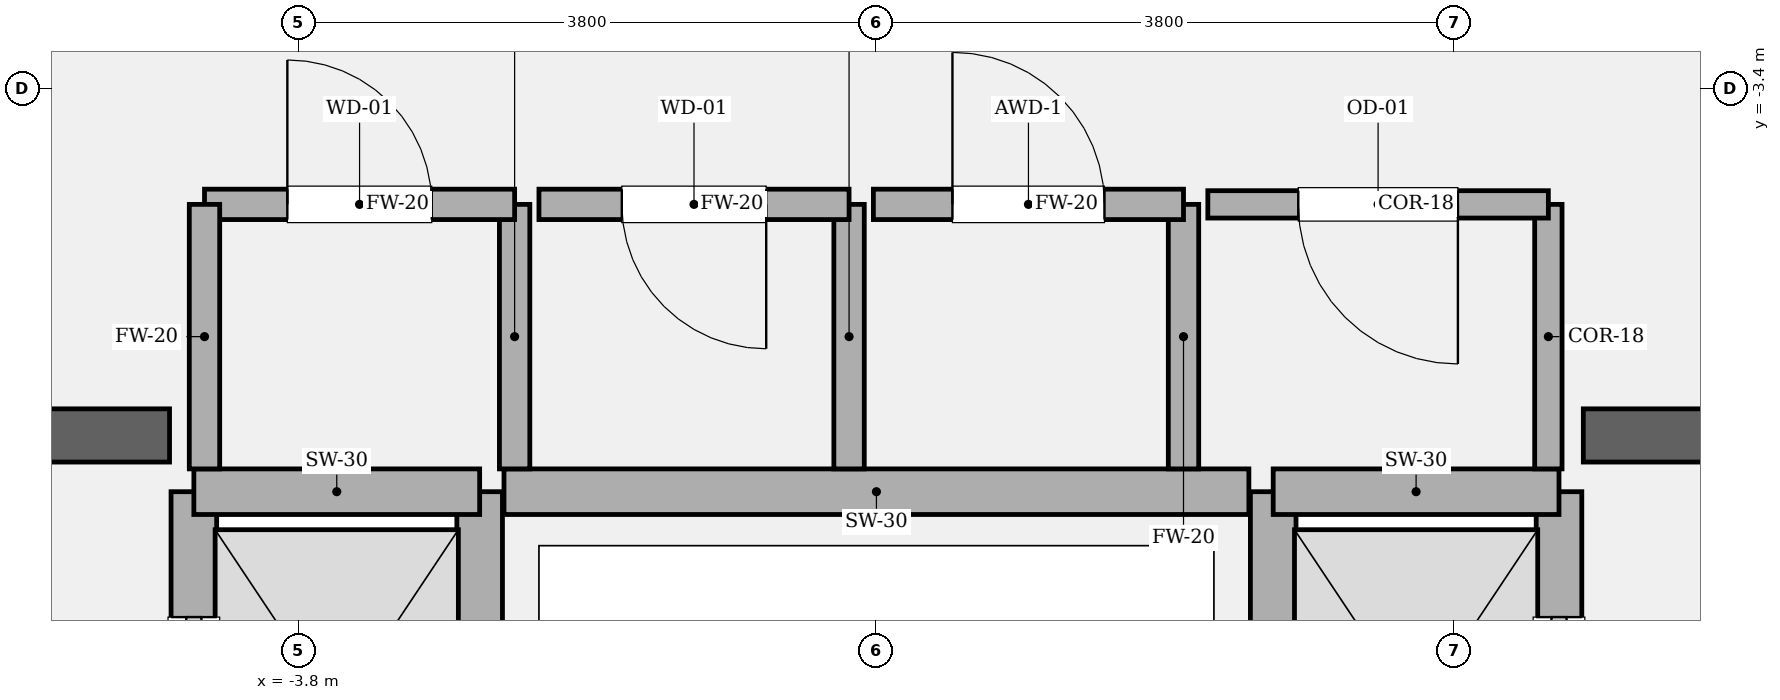
"""IFC4 building model, lengths in metres.
Left out: names, types, materials, properties, quantities, classifications, styles, units other than length and angle.
Written with IfcOpenShell. Run it as: python <this file> out.ifc"""

import sys

from ifc_helpers import new_model, si_unit, direction, frame, frame_2d, origin, place, context, subcontext, project, spatial, rectangle, extrude, element, fill, save


model = new_model("IFC4")
c1 = context("Model", 3, precision=1e-05, world=origin(), true_north=direction((0.0, 1.0)))
c2 = subcontext(c1, "Body", "Model", "MODEL_VIEW")
j1 = project(units=[si_unit("LENGTHUNIT", "METRE"), si_unit("PLANEANGLEUNIT", "RADIAN")], contexts=[c1])
p1 = place(None, origin())
s1 = spatial("IfcSite", under=j1, at=p1, CompositionType="ELEMENT")
p2 = place(p1, origin())
s2 = spatial("IfcBuilding", under=s1, at=p2, CompositionType="ELEMENT")
p3 = place(p2, frame((0.0, 0.0, 6.0)))
s3 = spatial("IfcBuildingStorey", under=s2, at=p3, CompositionType="ELEMENT", Elevation=6.0)
p4 = place(p3, frame((-9.825, -5.68, 0.0), z_axis=(0.0, 0.0, 1.0), x_axis=(1.0, 0.0, 0.0)))
e1 = element("IfcWall", 1, at=p4, inside=s3, PredefinedType="SOLIDWALL", context=c2, shape_type="SweptSolid", body=[
    extrude(rectangle(XDim=5.175, YDim=0.35, at=frame_2d((2.587, 0.0))), origin(), (0.0, 0.0, 1.0), 5.4),
])
p5 = place(p4, frame((1.285, 0.0, 0.0)))
e2 = element("IfcOpeningElement", 2, at=p5, cuts=e1, PredefinedType="OPENING", context=c2, shape_type="SweptSolid", body=[
    extrude(rectangle(XDim=1.18, YDim=2.2, at=frame_2d((0.59, 1.1))), frame((0.0, 0.185, 0.0), z_axis=(0.0, -1.0, 0.0), x_axis=(1.0, 0.0, 0.0)), (0.0, 0.0, 1.0), 0.37),
])
p6 = place(p3, frame((4.65, -5.68, 0.0), z_axis=(0.0, 0.0, 1.0), x_axis=(1.0, 0.0, 0.0)))
e3 = element("IfcWall", 3, at=p6, inside=s3, PredefinedType="SOLIDWALL", context=c2, shape_type="SweptSolid", body=[
    extrude(rectangle(XDim=5.175, YDim=0.35, at=frame_2d((2.587, 0.0))), origin(), (0.0, 0.0, 1.0), 5.4),
])
p7 = place(p6, frame((2.71, 0.0, 0.0)))
e4 = element("IfcOpeningElement", 4, at=p7, cuts=e3, PredefinedType="OPENING", context=c2, shape_type="SweptSolid", body=[
    extrude(rectangle(XDim=1.18, YDim=2.2, at=frame_2d((0.59, 1.1))), frame((0.0, 0.185, 0.0), z_axis=(0.0, -1.0, 0.0), x_axis=(1.0, 0.0, 0.0)), (0.0, 0.0, 1.0), 0.37),
])
p8 = place(p3, frame((-4.49, -8.82, 0.0), z_axis=(0.0, 0.0, 1.0), x_axis=(0.0, 1.0, 0.0)))
e5 = element("IfcWall", 5, at=p8, inside=s3, PredefinedType="SOLIDWALL", context=c2, shape_type="SweptSolid", body=[
    extrude(rectangle(XDim=2.77, YDim=0.3, at=frame_2d((1.385, 0.0))), origin(), (0.0, 0.0, 1.0), 5.12),
])
p9 = place(p8, frame((0.825, 0.0, 0.0)))
e6 = element("IfcOpeningElement", 6, at=p9, cuts=e5, PredefinedType="OPENING", context=c2, shape_type="SweptSolid", body=[
    extrude(rectangle(XDim=1.12, YDim=2.25, at=frame_2d((0.56, 1.125))), frame((0.0, 0.16, 0.0), z_axis=(0.0, -1.0, 0.0), x_axis=(1.0, 0.0, 0.0)), (0.0, 0.0, 1.0), 0.32),
])
p10 = place(p3, frame((-2.61, -8.82, 0.0), z_axis=(0.0, 0.0, 1.0), x_axis=(0.0, 1.0, 0.0)))
e7 = element("IfcWall", 7, at=p10, inside=s3, PredefinedType="SOLIDWALL", context=c2, shape_type="SweptSolid", body=[
    extrude(rectangle(XDim=2.77, YDim=0.3, at=frame_2d((1.385, 0.0))), origin(), (0.0, 0.0, 1.0), 5.12),
])
p11 = place(p3, frame((-4.49, -6.05, 0.0), z_axis=(0.0, 0.0, 1.0), x_axis=(1.0, 0.0, 0.0)))
e8 = element("IfcWall", 8, at=p11, inside=s3, PredefinedType="SOLIDWALL", context=c2, shape_type="SweptSolid", body=[
    extrude(rectangle(XDim=1.88, YDim=0.3, at=frame_2d((0.94, 0.0))), origin(), (0.0, 0.0, 1.0), 5.12),
])
p12 = place(p3, frame((4.49, -8.82, 0.0), z_axis=(0.0, 0.0, 1.0), x_axis=(0.0, 1.0, 0.0)))
e9 = element("IfcWall", 9, at=p12, inside=s3, PredefinedType="SOLIDWALL", context=c2, shape_type="SweptSolid", body=[
    extrude(rectangle(XDim=2.77, YDim=0.3, at=frame_2d((1.385, 0.0))), origin(), (0.0, 0.0, 1.0), 5.12),
])
p13 = place(p12, frame((0.825, 0.0, 0.0)))
e10 = element("IfcOpeningElement", 10, at=p13, cuts=e9, PredefinedType="OPENING", context=c2, shape_type="SweptSolid", body=[
    extrude(rectangle(XDim=1.12, YDim=2.25, at=frame_2d((0.56, 1.125))), frame((0.0, 0.16, 0.0), z_axis=(0.0, -1.0, 0.0), x_axis=(1.0, 0.0, 0.0)), (0.0, 0.0, 1.0), 0.32),
])
p14 = place(p3, frame((2.61, -8.82, 0.0), z_axis=(0.0, 0.0, 1.0), x_axis=(0.0, 1.0, 0.0)))
e11 = element("IfcWall", 11, at=p14, inside=s3, PredefinedType="SOLIDWALL", context=c2, shape_type="SweptSolid", body=[
    extrude(rectangle(XDim=2.77, YDim=0.3, at=frame_2d((1.385, 0.0))), origin(), (0.0, 0.0, 1.0), 5.12),
])
p15 = place(p3, frame((2.61, -6.05, 0.0), z_axis=(0.0, 0.0, 1.0), x_axis=(1.0, 0.0, 0.0)))
e12 = element("IfcWall", 12, at=p15, inside=s3, PredefinedType="SOLIDWALL", context=c2, shape_type="SweptSolid", body=[
    extrude(rectangle(XDim=1.88, YDim=0.3, at=frame_2d((0.94, 0.0))), origin(), (0.0, 0.0, 1.0), 5.12),
])
p16 = place(p3, frame((-2.45, -6.05, 0.0), z_axis=(0.0, 0.0, 1.0), x_axis=(1.0, 0.0, 0.0)))
e13 = element("IfcWall", 13, at=p16, inside=s3, PredefinedType="SOLIDWALL", context=c2, shape_type="SweptSolid", body=[
    extrude(rectangle(XDim=4.9, YDim=0.3, at=frame_2d((2.45, 0.0))), origin(), (0.0, 0.0, 1.0), 5.12),
])
p17 = place(p3, frame((-2.38, -5.9, 0.0), z_axis=(0.0, 0.0, 1.0), x_axis=(0.0, 1.0, 0.0)))
e14 = element("IfcWall", 14, at=p17, inside=s3, PredefinedType="SOLIDWALL", context=c2, shape_type="SweptSolid", body=[
    extrude(rectangle(XDim=1.74, YDim=0.2, at=frame_2d((0.87, 0.0))), origin(), (0.0, 0.0, 1.0), 5.12),
])
p18 = place(p3, frame((-2.38, -4.16, 0.0), z_axis=(0.0, 0.0, 1.0), x_axis=(-1.0, 0.0, 0.0)))
e15 = element("IfcWall", 15, at=p18, inside=s3, PredefinedType="SOLIDWALL", context=c2, shape_type="SweptSolid", body=[
    extrude(rectangle(XDim=2.04, YDim=0.2, at=frame_2d((1.02, 0.0))), origin(), (0.0, 0.0, 1.0), 5.12),
])
p19 = place(p18, frame((0.545, 0.0, 0.0)))
e16 = element("IfcOpeningElement", 16, at=p19, cuts=e15, PredefinedType="OPENING", context=c2, shape_type="SweptSolid", body=[
    extrude(rectangle(XDim=0.95, YDim=2.15, at=frame_2d((0.475, 1.075))), frame((0.0, 0.11, 0.0), z_axis=(0.0, -1.0, 0.0), x_axis=(1.0, 0.0, 0.0)), (0.0, 0.0, 1.0), 0.22),
])
for number, where, z_axis, x_axis in (
    (17, (-4.42, -4.16, 0.0), (0.0, 0.0, 1.0), (0.0, -1.0, 0.0)),
    (18, (-0.18, -5.9, 0.0), (0.0, 0.0, 1.0), (0.0, 1.0, 0.0)),
):
    element("IfcWall", number, at=place(p3, frame(where, z_axis=z_axis, x_axis=x_axis)), inside=s3, PredefinedType="SOLIDWALL", context=c2, shape_type="SweptSolid", body=[
        extrude(rectangle(XDim=1.74, YDim=0.2, at=frame_2d((0.87, 0.0))), origin(), (0.0, 0.0, 1.0), 5.12),
    ])
p20 = place(p3, frame((-0.18, -4.16, 0.0), z_axis=(0.0, 0.0, 1.0), x_axis=(-1.0, 0.0, 0.0)))
e19 = element("IfcWall", 19, at=p20, inside=s3, PredefinedType="SOLIDWALL", context=c2, shape_type="SweptSolid", body=[
    extrude(rectangle(XDim=2.04, YDim=0.2, at=frame_2d((1.02, 0.0))), origin(), (0.0, 0.0, 1.0), 5.12),
])
p21 = place(p20, frame((0.545, 0.0, 0.0)))
e20 = element("IfcOpeningElement", 20, at=p21, cuts=e19, PredefinedType="OPENING", context=c2, shape_type="SweptSolid", body=[
    extrude(rectangle(XDim=0.95, YDim=2.15, at=frame_2d((0.475, 1.075))), frame((0.0, 0.11, 0.0), z_axis=(0.0, -1.0, 0.0), x_axis=(1.0, 0.0, 0.0)), (0.0, 0.0, 1.0), 0.22),
])
p22 = place(p3, frame((2.02, -5.9, 0.0), z_axis=(0.0, 0.0, 1.0), x_axis=(0.0, 1.0, 0.0)))
e21 = element("IfcWall", 21, at=p22, inside=s3, PredefinedType="SOLIDWALL", context=c2, shape_type="SweptSolid", body=[
    extrude(rectangle(XDim=1.74, YDim=0.2, at=frame_2d((0.87, 0.0))), origin(), (0.0, 0.0, 1.0), 5.12),
])
p23 = place(p3, frame((2.02, -4.16, 0.0), z_axis=(0.0, 0.0, 1.0), x_axis=(-1.0, 0.0, 0.0)))
e22 = element("IfcWall", 22, at=p23, inside=s3, PredefinedType="SOLIDWALL", context=c2, shape_type="SweptSolid", body=[
    extrude(rectangle(XDim=2.04, YDim=0.2, at=frame_2d((1.02, 0.0))), origin(), (0.0, 0.0, 1.0), 5.12),
])
p24 = place(p23, frame((0.52, 0.0, 0.0)))
e23 = element("IfcOpeningElement", 23, at=p24, cuts=e22, PredefinedType="OPENING", context=c2, shape_type="SweptSolid", body=[
    extrude(rectangle(XDim=1.0, YDim=2.15, at=frame_2d((0.5, 1.075))), frame((0.0, 0.11, 0.0), z_axis=(0.0, -1.0, 0.0), x_axis=(1.0, 0.0, 0.0)), (0.0, 0.0, 1.0), 0.22),
])
p25 = place(p3, frame((4.42, -5.9, 0.0), z_axis=(0.0, 0.0, 1.0), x_axis=(0.0, 1.0, 0.0)))
e24 = element("IfcWall", 24, at=p25, inside=s3, PredefinedType="PARTITIONING", context=c2, shape_type="SweptSolid", body=[
    extrude(rectangle(XDim=1.74, YDim=0.18, at=frame_2d((0.87, 0.0))), origin(), (0.0, 0.0, 1.0), 5.12),
])
p26 = place(p3, frame((4.42, -4.16, 0.0), z_axis=(0.0, 0.0, 1.0), x_axis=(-1.0, 0.0, 0.0)))
e25 = element("IfcWall", 25, at=p26, inside=s3, PredefinedType="PARTITIONING", context=c2, shape_type="SweptSolid", body=[
    extrude(rectangle(XDim=2.24, YDim=0.18, at=frame_2d((1.12, 0.0))), origin(), (0.0, 0.0, 1.0), 5.12),
])
p27 = place(p26, frame((0.595, 0.0, 0.0)))
e26 = element("IfcOpeningElement", 26, at=p27, cuts=e25, PredefinedType="OPENING", context=c2, shape_type="SweptSolid", body=[
    extrude(rectangle(XDim=1.05, YDim=2.2, at=frame_2d((0.525, 1.1))), frame((0.0, 0.1, 0.0), z_axis=(0.0, -1.0, 0.0), x_axis=(1.0, 0.0, 0.0)), (0.0, 0.0, 1.0), 0.2),
])
p28 = place(p9, origin())
e27 = element("IfcDoor", 27, at=p28, inside=s3, OperationType="SLIDING_TO_LEFT", PredefinedType="DOOR", context=c2, shape_type="SweptSolid", body=[
    extrude(rectangle(XDim=1.12, YDim=2.25, at=frame_2d((0.56, 1.125))), frame((0.0, 0.025, 0.0), z_axis=(0.0, -1.0, 0.0), x_axis=(1.0, 0.0, 0.0)), (0.0, 0.0, 1.0), 0.05),
])
fill(e6, e27)
p29 = place(p13, origin())
e28 = element("IfcDoor", 28, at=p29, inside=s3, OperationType="SLIDING_TO_RIGHT", PredefinedType="DOOR", context=c2, shape_type="SweptSolid", body=[
    extrude(rectangle(XDim=1.12, YDim=2.25, at=frame_2d((0.56, 1.125))), frame((0.0, 0.025, 0.0), z_axis=(0.0, -1.0, 0.0), x_axis=(1.0, 0.0, 0.0)), (0.0, 0.0, 1.0), 0.05),
])
fill(e10, e28)
p30 = place(p19, origin())
e29 = element("IfcDoor", 29, at=p30, inside=s3, OperationType="SINGLE_SWING_RIGHT", PredefinedType="DOOR", context=c2, shape_type="SweptSolid", body=[
    extrude(rectangle(XDim=0.95, YDim=2.15, at=frame_2d((0.475, 1.075))), frame((0.0, 0.025, 0.0), z_axis=(0.0, -1.0, 0.0), x_axis=(1.0, 0.0, 0.0)), (0.0, 0.0, 1.0), 0.05),
])
fill(e16, e29)
p31 = place(p21, origin())
e30 = element("IfcDoor", 30, at=p31, inside=s3, OperationType="SINGLE_SWING_LEFT", PredefinedType="DOOR", context=c2, shape_type="SweptSolid", body=[
    extrude(rectangle(XDim=0.95, YDim=2.15, at=frame_2d((0.475, 1.075))), frame((0.0, 0.025, 0.0), z_axis=(0.0, -1.0, 0.0), x_axis=(1.0, 0.0, 0.0)), (0.0, 0.0, 1.0), 0.05),
])
fill(e20, e30)
p32 = place(p24, origin())
e31 = element("IfcDoor", 31, at=p32, inside=s3, OperationType="SINGLE_SWING_RIGHT", PredefinedType="DOOR", context=c2, shape_type="SweptSolid", body=[
    extrude(rectangle(XDim=1.0, YDim=2.15, at=frame_2d((0.5, 1.075))), frame((0.0, 0.025, 0.0), z_axis=(0.0, -1.0, 0.0), x_axis=(1.0, 0.0, 0.0)), (0.0, 0.0, 1.0), 0.05),
])
fill(e23, e31)
p33 = place(p27, origin())
e32 = element("IfcDoor", 32, at=p33, inside=s3, OperationType="SINGLE_SWING_LEFT", PredefinedType="DOOR", context=c2, shape_type="SweptSolid", body=[
    extrude(rectangle(XDim=1.05, YDim=2.2, at=frame_2d((0.525, 1.1))), frame((0.0, 0.025, 0.0), z_axis=(0.0, -1.0, 0.0), x_axis=(1.0, 0.0, 0.0)), (0.0, 0.0, 1.0), 0.05),
])
fill(e26, e32)
save(model, sys.argv[1])
